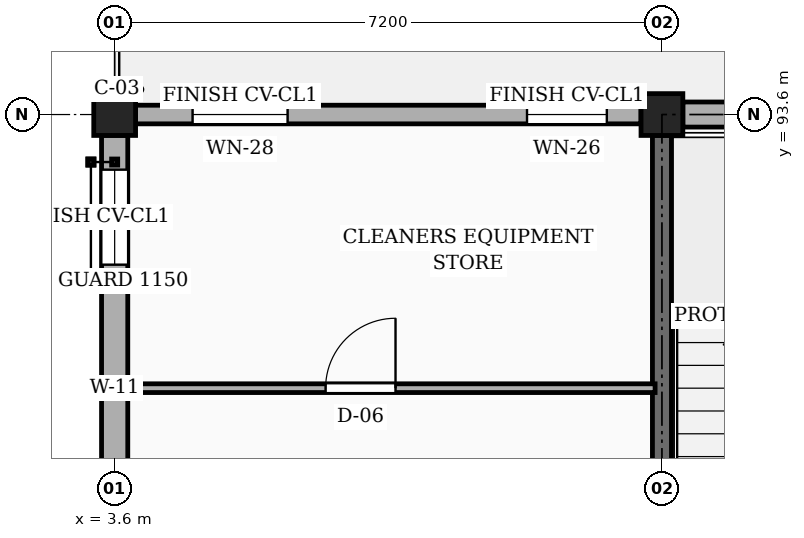
"""IFC4 building model, lengths in metres.
Left out: names, types, materials, properties, quantities, classifications, styles, units other than length and angle.
Written with IfcOpenShell. Run it as: python <this file> out.ifc"""

import sys

from ifc_helpers import new_model, si_unit, direction, frame, frame_2d, origin, origin_2d, place, context, subcontext, project, spatial, rectangle, extrude, element, fill, save


model = new_model("IFC4")
c1 = context("Model", 3, precision=1e-05, world=origin(), true_north=direction((0.0, 1.0)))
c2 = subcontext(c1, "Body", "Model", "MODEL_VIEW")
j1 = project(units=[si_unit("LENGTHUNIT", "METRE"), si_unit("PLANEANGLEUNIT", "RADIAN")], contexts=[c1])
p1 = place(None, origin())
s1 = spatial("IfcSite", under=j1, at=p1, CompositionType="ELEMENT")
p2 = place(p1, origin())
s2 = spatial("IfcBuilding", under=s1, at=p2, CompositionType="ELEMENT")
p3 = place(p2, frame((0.0, 0.0, 20.25)))
s3 = spatial("IfcBuildingStorey", under=s2, at=p3, CompositionType="ELEMENT", Elevation=20.25)
for number, where, z_axis, x_axis in (
    (1, (3.6, 93.6, 0.0), (0.0, 0.0, 1.0), (1.0, 0.0, 0.0)),
    (2, (10.8, 93.6, 0.0), (0.0, 0.0, 1.0), (1.0, 0.0, 0.0)),
):
    element("IfcColumn", number, at=place(p3, frame(where, z_axis=z_axis, x_axis=x_axis)), inside=s3, PredefinedType="COLUMN", context=c2, shape_type="SweptSolid", body=[
        extrude(rectangle(XDim=0.55, YDim=0.55, at=origin_2d()), origin(), (0.0, 0.0, 1.0), 3.15),
    ])
p4 = place(p3, frame((17.725, 93.6, 0.0), z_axis=(0.0, 0.0, 1.0), x_axis=(-1.0, 0.0, 0.0)))
e3 = element("IfcWall", 3, at=p4, inside=s3, PredefinedType="SOLIDWALL", context=c2, shape_type="SweptSolid", body=[
    extrude(rectangle(XDim=6.65, YDim=0.33, at=frame_2d((3.325, 0.0))), origin(), (0.0, 0.0, 1.0), 2.48),
])
p5 = place(p4, frame((2.9, 0.0, 0.9)))
e4 = element("IfcOpeningElement", 4, at=p5, cuts=e3, PredefinedType="OPENING", context=c2, shape_type="SweptSolid", body=[
    extrude(rectangle(XDim=0.85, YDim=1.15, at=frame_2d((0.425, 0.575))), frame((0.0, 0.175, 0.0), z_axis=(0.0, -1.0, 0.0), x_axis=(1.0, 0.0, 0.0)), (0.0, 0.0, 1.0), 0.35),
])
p6 = place(p3, frame((10.525, 93.6, 0.0), z_axis=(0.0, 0.0, 1.0), x_axis=(-1.0, 0.0, 0.0)))
e5 = element("IfcWall", 5, at=p6, inside=s3, PredefinedType="SOLIDWALL", context=c2, shape_type="SweptSolid", body=[
    extrude(rectangle(XDim=6.65, YDim=0.245, at=frame_2d((3.325, 0.0))), origin(), (0.0, 0.0, 1.0), 2.48),
])
p7 = place(p6, frame((0.45, 0.0, 0.78)))
e6 = element("IfcOpeningElement", 6, at=p7, cuts=e5, PredefinedType="OPENING", context=c2, shape_type="SweptSolid", body=[
    extrude(rectangle(XDim=1.05, YDim=1.44, at=frame_2d((0.525, 0.72))), frame((0.0, 0.133, 0.0), z_axis=(0.0, -1.0, 0.0), x_axis=(1.0, 0.0, 0.0)), (0.0, 0.0, 1.0), 0.265),
])
p8 = place(p6, frame((4.65, 0.0, 0.78)))
e7 = element("IfcOpeningElement", 7, at=p8, cuts=e5, PredefinedType="OPENING", context=c2, shape_type="SweptSolid", body=[
    extrude(rectangle(XDim=1.25, YDim=1.44, at=frame_2d((0.625, 0.72))), frame((0.0, 0.133, 0.0), z_axis=(0.0, -1.0, 0.0), x_axis=(1.0, 0.0, 0.0)), (0.0, 0.0, 1.0), 0.265),
])
p9 = place(p3, frame((3.6, 93.325, 0.0), z_axis=(0.0, 0.0, 1.0), x_axis=(0.0, -1.0, 0.0)))
e8 = element("IfcWall", 8, at=p9, inside=s3, PredefinedType="SOLIDWALL", context=c2, shape_type="SweptSolid", body=[
    extrude(rectangle(XDim=6.65, YDim=0.345, at=frame_2d((3.325, 0.0))), origin(), (0.0, 0.0, 1.0), 2.48),
])
p10 = place(p9, frame((0.45, 0.0, 0.78)))
e9 = element("IfcOpeningElement", 9, at=p10, cuts=e8, PredefinedType="OPENING", context=c2, shape_type="SweptSolid", body=[
    extrude(rectangle(XDim=1.25, YDim=1.44, at=frame_2d((0.625, 0.72))), frame((0.0, 0.183, 0.0), z_axis=(0.0, -1.0, 0.0), x_axis=(1.0, 0.0, 0.0)), (0.0, 0.0, 1.0), 0.365),
])
p11 = place(p9, frame((4.65, 0.0, 0.78)))
e10 = element("IfcOpeningElement", 10, at=p11, cuts=e8, PredefinedType="OPENING", context=c2, shape_type="SweptSolid", body=[
    extrude(rectangle(XDim=1.45, YDim=1.44, at=frame_2d((0.725, 0.72))), frame((0.0, 0.183, 0.0), z_axis=(0.0, -1.0, 0.0), x_axis=(1.0, 0.0, 0.0)), (0.0, 0.0, 1.0), 0.365),
])
p12 = place(p3, frame((10.8, 86.725, 0.0), z_axis=(0.0, 0.0, 1.0), x_axis=(0.0, 1.0, 0.0)))
e11 = element("IfcWall", 11, at=p12, inside=s3, PredefinedType="SHEAR", context=c2, shape_type="SweptSolid", body=[
    extrude(rectangle(XDim=6.6, YDim=0.25, at=frame_2d((3.3, 0.0))), origin(), (0.0, 0.0, 1.0), 2.91),
])
p13 = place(p3, frame((3.775, 90.0, 0.0), z_axis=(0.0, 0.0, 1.0), x_axis=(1.0, 0.0, 0.0)))
e12 = element("IfcWall", 12, at=p13, inside=s3, PredefinedType="PARTITIONING", context=c2, shape_type="SweptSolid", body=[
    extrude(rectangle(XDim=6.935, YDim=0.115, at=frame_2d((3.468, 0.0))), origin(), (0.0, 0.0, 1.0), 2.345),
])
p14 = place(p13, frame((2.6, 0.0, 0.0)))
e13 = element("IfcOpeningElement", 13, at=p14, cuts=e12, PredefinedType="OPENING", context=c2, shape_type="SweptSolid", body=[
    extrude(rectangle(XDim=0.92, YDim=2.1, at=frame_2d((0.46, 1.05))), frame((0.0, 0.067, 0.0), z_axis=(0.0, -1.0, 0.0), x_axis=(1.0, 0.0, 0.0)), (0.0, 0.0, 1.0), 0.135),
])
p15 = place(p7, origin())
e14 = element("IfcWindow", 14, at=p15, inside=s3, PartitioningType="SINGLE_PANEL", PredefinedType="WINDOW", context=c2, shape_type="SweptSolid", body=[
    extrude(rectangle(XDim=1.05, YDim=1.44, at=frame_2d((0.525, 0.72))), frame((0.0, 0.03, 0.0), z_axis=(0.0, -1.0, 0.0), x_axis=(1.0, 0.0, 0.0)), (0.0, 0.0, 1.0), 0.06),
])
fill(e6, e14)
p16 = place(p8, origin())
e15 = element("IfcWindow", 15, at=p16, inside=s3, PartitioningType="SINGLE_PANEL", PredefinedType="WINDOW", context=c2, shape_type="SweptSolid", body=[
    extrude(rectangle(XDim=1.25, YDim=1.44, at=frame_2d((0.625, 0.72))), frame((0.0, 0.03, 0.0), z_axis=(0.0, -1.0, 0.0), x_axis=(1.0, 0.0, 0.0)), (0.0, 0.0, 1.0), 0.06),
])
fill(e7, e15)
p17 = place(p10, origin())
e16 = element("IfcWindow", 16, at=p17, inside=s3, PartitioningType="SINGLE_PANEL", PredefinedType="WINDOW", context=c2, shape_type="SweptSolid", body=[
    extrude(rectangle(XDim=1.25, YDim=1.44, at=frame_2d((0.625, 0.72))), frame((0.0, 0.03, 0.0), z_axis=(0.0, -1.0, 0.0), x_axis=(1.0, 0.0, 0.0)), (0.0, 0.0, 1.0), 0.06),
])
fill(e9, e16)
p18 = place(p14, origin())
e17 = element("IfcDoor", 17, at=p18, inside=s3, OperationType="SINGLE_SWING_RIGHT", PredefinedType="DOOR", context=c2, shape_type="SweptSolid", body=[
    extrude(rectangle(XDim=0.92, YDim=2.1, at=frame_2d((0.46, 1.05))), frame((0.0, 0.025, 0.0), z_axis=(0.0, -1.0, 0.0), x_axis=(1.0, 0.0, 0.0)), (0.0, 0.0, 1.0), 0.05),
])
fill(e13, e17)
save(model, sys.argv[1])
